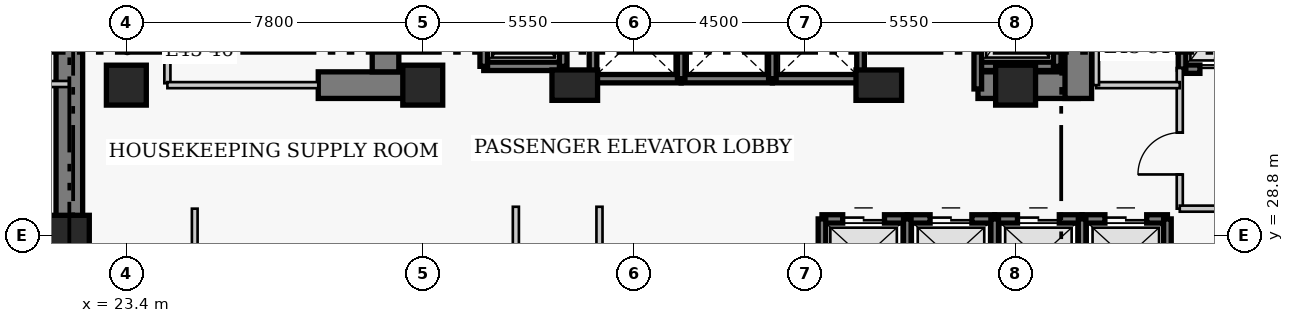
"""IFC4 building model, lengths in metres.
Left out: names, types, materials, properties, quantities, classifications, styles, units other than length and angle.
Written with IfcOpenShell. Run it as: python <this file> out.ifc"""

import sys

from ifc_helpers import new_model, si_unit, direction, frame, frame_2d, origin, origin_2d, place, context, subcontext, project, spatial, rectangle, extrude, element, fill, save


model = new_model("IFC4")
c1 = context("Model", 3, precision=1e-05, world=origin(), true_north=direction((0.0, 1.0)))
c2 = subcontext(c1, "Body", "Model", "MODEL_VIEW")
j1 = project(units=[si_unit("LENGTHUNIT", "METRE"), si_unit("PLANEANGLEUNIT", "RADIAN")], contexts=[c1])
p1 = place(None, origin())
s1 = spatial("IfcSite", under=j1, at=p1, CompositionType="ELEMENT")
p2 = place(p1, origin())
s2 = spatial("IfcBuilding", under=s1, at=p2, CompositionType="ELEMENT")
p3 = place(p2, frame((0.0, 0.0, 172.6)))
s3 = spatial("IfcBuildingStorey", under=s2, at=p3, CompositionType="ELEMENT", Elevation=172.6)
p4 = place(p3, frame((21.9, 27.05, 0.0), z_axis=(0.0, 0.0, 1.0), x_axis=(0.0, 1.0, 0.0)))
e1 = element("IfcWall", 1, at=p4, inside=s3, PredefinedType="SHEAR", context=c2, shape_type="SweptSolid", body=[
    extrude(rectangle(XDim=13.62, YDim=0.7, at=frame_2d((6.81, 0.0))), origin(), (0.0, 0.0, 1.0), 3.8),
])
p5 = place(p3, frame((28.45, 32.75, 0.0), z_axis=(0.0, 0.0, 1.0), x_axis=(1.0, 0.0, 0.0)))
e2 = element("IfcWall", 2, at=p5, inside=s3, PredefinedType="SHEAR", context=c2, shape_type="SweptSolid", body=[
    extrude(rectangle(XDim=2.4, YDim=0.7, at=frame_2d((1.2, 0.0))), origin(), (0.0, 0.0, 1.0), 3.8),
])
p6 = place(p3, frame((45.81, 32.75, 0.0), z_axis=(0.0, 0.0, 1.0), x_axis=(1.0, 0.0, 0.0)))
e3 = element("IfcWall", 3, at=p6, inside=s3, PredefinedType="SHEAR", context=c2, shape_type="SweptSolid", body=[
    extrude(rectangle(XDim=2.64, YDim=0.7, at=frame_2d((1.32, 0.0))), origin(), (0.0, 0.0, 1.0), 3.8),
])
p7 = place(p3, frame((30.22, 33.1, 0.0), z_axis=(0.0, 0.0, 1.0), x_axis=(0.0, 1.0, 0.0)))
e4 = element("IfcWall", 4, at=p7, inside=s3, PredefinedType="SHEAR", context=c2, shape_type="SweptSolid", body=[
    extrude(rectangle(XDim=7.22, YDim=0.7, at=frame_2d((3.61, 0.0))), origin(), (0.0, 0.0, 1.0), 3.8),
])
p8 = place(p3, frame((48.45, 32.4, 0.0), z_axis=(0.0, 0.0, 1.0), x_axis=(0.0, 1.0, 0.0)))
e5 = element("IfcWall", 5, at=p8, inside=s3, PredefinedType="SHEAR", context=c2, shape_type="SweptSolid", body=[
    extrude(rectangle(XDim=7.92, YDim=0.7, at=frame_2d((3.96, 0.0))), origin(), (0.0, 0.0, 1.0), 3.8),
])
p9 = place(p8, frame((5.8, 0.0, 0.0)))
e6 = element("IfcOpeningElement", 6, at=p9, cuts=e5, PredefinedType="OPENING", context=c2, shape_type="SweptSolid", body=[
    extrude(rectangle(XDim=1.1, YDim=2.15, at=frame_2d((0.55, 1.075))), frame((0.0, 0.36, 0.0), z_axis=(0.0, -1.0, 0.0), x_axis=(1.0, 0.0, 0.0)), (0.0, 0.0, 1.0), 0.72),
])
for number, where, z_axis, x_axis in (
    (7, (21.9, 28.8, 0.0), (0.0, 0.0, 1.0), (1.0, 0.0, 0.0)),
    (8, (23.4, 32.75, 0.0), (0.0, 0.0, 1.0), (1.0, 0.0, 0.0)),
    (9, (31.2, 32.75, 0.0), (0.0, 0.0, 1.0), (1.0, 0.0, 0.0)),
):
    element("IfcColumn", number, at=place(p3, frame(where, z_axis=z_axis, x_axis=x_axis)), inside=s3, PredefinedType="COLUMN", context=c2, shape_type="SweptSolid", body=[
        extrude(rectangle(XDim=1.05, YDim=1.05, at=origin_2d()), origin(), (0.0, 0.0, 1.0), 3.8),
    ])
for number, where, z_axis, x_axis in (
    (10, (35.2, 32.75, 0.0), (0.0, 0.0, 1.0), (1.0, 0.0, 0.0)),
    (11, (43.2, 32.75, 0.0), (0.0, 0.0, 1.0), (1.0, 0.0, 0.0)),
):
    element("IfcColumn", number, at=place(p3, frame(where, z_axis=z_axis, x_axis=x_axis)), inside=s3, PredefinedType="COLUMN", context=c2, shape_type="SweptSolid", body=[
        extrude(rectangle(XDim=1.2, YDim=0.8, at=origin_2d()), origin(), (0.0, 0.0, 1.0), 3.8),
    ])
p10 = place(p3, frame((46.8, 32.75, 0.0), z_axis=(0.0, 0.0, 1.0), x_axis=(1.0, 0.0, 0.0)))
e12 = element("IfcColumn", 12, at=p10, inside=s3, PredefinedType="COLUMN", context=c2, shape_type="SweptSolid", body=[
    extrude(rectangle(XDim=1.05, YDim=1.05, at=origin_2d()), origin(), (0.0, 0.0, 1.0), 3.8),
])
p11 = place(p3, frame((41.705, 29.23, 0.0), z_axis=(0.0, 0.0, 1.0), x_axis=(1.0, 0.0, 0.0)))
e13 = element("IfcWall", 13, at=p11, inside=s3, PredefinedType="SHEAR", context=c2, shape_type="SweptSolid", body=[
    extrude(rectangle(XDim=2.245, YDim=0.22, at=frame_2d((1.123, 0.0))), origin(), (0.0, 0.0, 1.0), 3.8),
])
p12 = place(p11, frame((0.545, 0.0, 0.0)))
e14 = element("IfcOpeningElement", 14, at=p12, cuts=e13, PredefinedType="OPENING", context=c2, shape_type="SweptSolid", body=[
    extrude(rectangle(XDim=1.1, YDim=2.15, at=frame_2d((0.55, 1.075))), frame((0.0, 0.12, 0.0), z_axis=(0.0, -1.0, 0.0), x_axis=(1.0, 0.0, 0.0)), (0.0, 0.0, 1.0), 0.24),
])
p13 = place(p3, frame((41.705, 27.17, 0.0), z_axis=(0.0, 0.0, 1.0), x_axis=(0.0, 1.0, 0.0)))
e15 = element("IfcWall", 15, at=p13, inside=s3, PredefinedType="SHEAR", context=c2, shape_type="SweptSolid", body=[
    extrude(rectangle(XDim=2.06, YDim=0.2, at=frame_2d((1.03, 0.0))), origin(), (0.0, 0.0, 1.0), 3.8),
])
p14 = place(p3, frame((43.95, 29.23, 0.0), z_axis=(0.0, 0.0, 1.0), x_axis=(1.0, 0.0, 0.0)))
e16 = element("IfcWall", 16, at=p14, inside=s3, PredefinedType="SHEAR", context=c2, shape_type="SweptSolid", body=[
    extrude(rectangle(XDim=2.3, YDim=0.22, at=frame_2d((1.15, 0.0))), origin(), (0.0, 0.0, 1.0), 3.8),
])
p15 = place(p14, frame((0.6, 0.0, 0.0)))
e17 = element("IfcOpeningElement", 17, at=p15, cuts=e16, PredefinedType="OPENING", context=c2, shape_type="SweptSolid", body=[
    extrude(rectangle(XDim=1.1, YDim=2.15, at=frame_2d((0.55, 1.075))), frame((0.0, 0.12, 0.0), z_axis=(0.0, -1.0, 0.0), x_axis=(1.0, 0.0, 0.0)), (0.0, 0.0, 1.0), 0.24),
])
p16 = place(p3, frame((43.95, 27.17, 0.0), z_axis=(0.0, 0.0, 1.0), x_axis=(0.0, 1.0, 0.0)))
e18 = element("IfcWall", 18, at=p16, inside=s3, PredefinedType="SHEAR", context=c2, shape_type="SweptSolid", body=[
    extrude(rectangle(XDim=2.06, YDim=0.2, at=frame_2d((1.03, 0.0))), origin(), (0.0, 0.0, 1.0), 3.8),
])
p17 = place(p3, frame((46.25, 29.23, 0.0), z_axis=(0.0, 0.0, 1.0), x_axis=(1.0, 0.0, 0.0)))
e19 = element("IfcWall", 19, at=p17, inside=s3, PredefinedType="SHEAR", context=c2, shape_type="SweptSolid", body=[
    extrude(rectangle(XDim=2.3, YDim=0.22, at=frame_2d((1.15, 0.0))), origin(), (0.0, 0.0, 1.0), 3.8),
])
p18 = place(p17, frame((0.6, 0.0, 0.0)))
e20 = element("IfcOpeningElement", 20, at=p18, cuts=e19, PredefinedType="OPENING", context=c2, shape_type="SweptSolid", body=[
    extrude(rectangle(XDim=1.1, YDim=2.15, at=frame_2d((0.55, 1.075))), frame((0.0, 0.12, 0.0), z_axis=(0.0, -1.0, 0.0), x_axis=(1.0, 0.0, 0.0)), (0.0, 0.0, 1.0), 0.24),
])
p19 = place(p3, frame((46.25, 27.17, 0.0), z_axis=(0.0, 0.0, 1.0), x_axis=(0.0, 1.0, 0.0)))
e21 = element("IfcWall", 21, at=p19, inside=s3, PredefinedType="SHEAR", context=c2, shape_type="SweptSolid", body=[
    extrude(rectangle(XDim=2.06, YDim=0.2, at=frame_2d((1.03, 0.0))), origin(), (0.0, 0.0, 1.0), 3.8),
])
p20 = place(p3, frame((48.55, 29.23, 0.0), z_axis=(0.0, 0.0, 1.0), x_axis=(1.0, 0.0, 0.0)))
e22 = element("IfcWall", 22, at=p20, inside=s3, PredefinedType="SHEAR", context=c2, shape_type="SweptSolid", body=[
    extrude(rectangle(XDim=2.245, YDim=0.22, at=frame_2d((1.123, 0.0))), origin(), (0.0, 0.0, 1.0), 3.8),
])
p21 = place(p20, frame((0.6, 0.0, 0.0)))
e23 = element("IfcOpeningElement", 23, at=p21, cuts=e22, PredefinedType="OPENING", context=c2, shape_type="SweptSolid", body=[
    extrude(rectangle(XDim=1.1, YDim=2.15, at=frame_2d((0.55, 1.075))), frame((0.0, 0.12, 0.0), z_axis=(0.0, -1.0, 0.0), x_axis=(1.0, 0.0, 0.0)), (0.0, 0.0, 1.0), 0.24),
])
for number, where, z_axis, x_axis in (
    (24, (48.55, 27.17, 0.0), (0.0, 0.0, 1.0), (0.0, 1.0, 0.0)),
    (25, (50.795, 27.17, 0.0), (0.0, 0.0, 1.0), (0.0, 1.0, 0.0)),
):
    element("IfcWall", number, at=place(p3, frame(where, z_axis=z_axis, x_axis=x_axis)), inside=s3, PredefinedType="SHEAR", context=c2, shape_type="SweptSolid", body=[
        extrude(rectangle(XDim=2.06, YDim=0.2, at=frame_2d((1.03, 0.0))), origin(), (0.0, 0.0, 1.0), 3.8),
    ])
p22 = place(p3, frame((35.68, 32.92, 0.0), z_axis=(0.0, 0.0, 1.0), x_axis=(1.0, 0.0, 0.0)))
e26 = element("IfcWall", 26, at=p22, inside=s3, PredefinedType="SHEAR", context=c2, shape_type="SweptSolid", body=[
    extrude(rectangle(XDim=2.32, YDim=0.22, at=frame_2d((1.16, 0.0))), origin(), (0.0, 0.0, 1.0), 3.8),
])
p23 = place(p3, frame((35.68, 32.92, 0.0), z_axis=(0.0, 0.0, 1.0), x_axis=(0.0, 1.0, 0.0)))
e27 = element("IfcWall", 27, at=p23, inside=s3, PredefinedType="SHEAR", context=c2, shape_type="SweptSolid", body=[
    extrude(rectangle(XDim=2.16, YDim=0.2, at=frame_2d((1.08, 0.0))), origin(), (0.0, 0.0, 1.0), 3.8),
])
p24 = place(p3, frame((38.0, 32.92, 0.0), z_axis=(0.0, 0.0, 1.0), x_axis=(1.0, 0.0, 0.0)))
e28 = element("IfcWall", 28, at=p24, inside=s3, PredefinedType="SHEAR", context=c2, shape_type="SweptSolid", body=[
    extrude(rectangle(XDim=2.4, YDim=0.22, at=frame_2d((1.2, 0.0))), origin(), (0.0, 0.0, 1.0), 3.8),
])
p25 = place(p3, frame((38.0, 32.92, 0.0), z_axis=(0.0, 0.0, 1.0), x_axis=(0.0, 1.0, 0.0)))
e29 = element("IfcWall", 29, at=p25, inside=s3, PredefinedType="SHEAR", context=c2, shape_type="SweptSolid", body=[
    extrude(rectangle(XDim=2.16, YDim=0.2, at=frame_2d((1.08, 0.0))), origin(), (0.0, 0.0, 1.0), 3.8),
])
p26 = place(p3, frame((40.4, 32.92, 0.0), z_axis=(0.0, 0.0, 1.0), x_axis=(1.0, 0.0, 0.0)))
e30 = element("IfcWall", 30, at=p26, inside=s3, PredefinedType="SHEAR", context=c2, shape_type="SweptSolid", body=[
    extrude(rectangle(XDim=2.32, YDim=0.22, at=frame_2d((1.16, 0.0))), origin(), (0.0, 0.0, 1.0), 3.8),
])
for number, where, z_axis, x_axis in (
    (31, (40.4, 32.92, 0.0), (0.0, 0.0, 1.0), (0.0, 1.0, 0.0)),
    (32, (42.72, 32.92, 0.0), (0.0, 0.0, 1.0), (0.0, 1.0, 0.0)),
):
    element("IfcWall", number, at=place(p3, frame(where, z_axis=z_axis, x_axis=x_axis)), inside=s3, PredefinedType="SHEAR", context=c2, shape_type="SweptSolid", body=[
        extrude(rectangle(XDim=2.16, YDim=0.2, at=frame_2d((1.08, 0.0))), origin(), (0.0, 0.0, 1.0), 3.8),
    ])
p27 = place(p3, frame((51.18, 33.17, 0.0), z_axis=(0.0, 0.0, 1.0), x_axis=(1.0, 0.0, 0.0)))
e33 = element("IfcWall", 33, at=p27, inside=s3, PredefinedType="SHEAR", context=c2, shape_type="SweptSolid", body=[
    extrude(rectangle(XDim=2.42, YDim=0.22, at=frame_2d((1.21, 0.0))), origin(), (0.0, 0.0, 1.0), 3.8),
])
p28 = place(p27, frame((0.47, 0.0, 0.0)))
e34 = element("IfcOpeningElement", 34, at=p28, cuts=e33, PredefinedType="OPENING", context=c2, shape_type="SweptSolid", body=[
    extrude(rectangle(XDim=1.3, YDim=2.15, at=frame_2d((0.65, 1.075))), frame((0.0, 0.12, 0.0), z_axis=(0.0, -1.0, 0.0), x_axis=(1.0, 0.0, 0.0)), (0.0, 0.0, 1.0), 0.24),
])
p29 = place(p3, frame((51.18, 33.17, 0.0), z_axis=(0.0, 0.0, 1.0), x_axis=(0.0, 1.0, 0.0)))
e35 = element("IfcWall", 35, at=p29, inside=s3, PredefinedType="SHEAR", context=c2, shape_type="SweptSolid", body=[
    extrude(rectangle(XDim=2.86, YDim=0.2, at=frame_2d((1.43, 0.0))), origin(), (0.0, 0.0, 1.0), 3.8),
])
p30 = place(p3, frame((32.805, 33.245, 0.0), z_axis=(0.0, 0.0, 1.0), x_axis=(1.0, 0.0, 0.0)))
e36 = element("IfcWall", 36, at=p30, inside=s3, PredefinedType="SHEAR", context=c2, shape_type="SweptSolid", body=[
    extrude(rectangle(XDim=2.09, YDim=0.22, at=frame_2d((1.045, 0.0))), origin(), (0.0, 0.0, 1.0), 3.8),
])
for number, where, z_axis, x_axis in (
    (37, (32.805, 33.245, 0.0), (0.0, 0.0, 1.0), (0.0, 1.0, 0.0)),
    (38, (34.895, 33.245, 0.0), (0.0, 0.0, 1.0), (0.0, 1.0, 0.0)),
):
    element("IfcWall", number, at=place(p3, frame(where, z_axis=z_axis, x_axis=x_axis)), inside=s3, PredefinedType="SHEAR", context=c2, shape_type="SweptSolid", body=[
        extrude(rectangle(XDim=2.91, YDim=0.2, at=frame_2d((1.455, 0.0))), origin(), (0.0, 0.0, 1.0), 3.8),
    ])
p31 = place(p3, frame((45.805, 33.245, 0.0), z_axis=(0.0, 0.0, 1.0), x_axis=(1.0, 0.0, 0.0)))
e39 = element("IfcWall", 39, at=p31, inside=s3, PredefinedType="SHEAR", context=c2, shape_type="SweptSolid", body=[
    extrude(rectangle(XDim=2.09, YDim=0.22, at=frame_2d((1.045, 0.0))), origin(), (0.0, 0.0, 1.0), 3.8),
])
p32 = place(p3, frame((45.805, 32.65, 0.0), z_axis=(0.0, 0.0, 1.0), x_axis=(0.0, 1.0, 0.0)))
e40 = element("IfcWall", 40, at=p32, inside=s3, PredefinedType="SHEAR", context=c2, shape_type="SweptSolid", body=[
    extrude(rectangle(XDim=3.505, YDim=0.2, at=frame_2d((1.752, 0.0))), origin(), (0.0, 0.0, 1.0), 3.8),
])
p33 = place(p3, frame((47.895, 33.245, 0.0), z_axis=(0.0, 0.0, 1.0), x_axis=(0.0, 1.0, 0.0)))
e41 = element("IfcWall", 41, at=p33, inside=s3, PredefinedType="SHEAR", context=c2, shape_type="SweptSolid", body=[
    extrude(rectangle(XDim=2.91, YDim=0.2, at=frame_2d((1.455, 0.0))), origin(), (0.0, 0.0, 1.0), 3.8),
])
p34 = place(p3, frame((24.48, 32.8, 0.0), z_axis=(0.0, 0.0, 1.0), x_axis=(0.0, 1.0, 0.0)))
e42 = element("IfcWall", 42, at=p34, inside=s3, PredefinedType="PARTITIONING", context=c2, shape_type="SweptSolid", body=[
    extrude(rectangle(XDim=3.57, YDim=0.16, at=frame_2d((1.785, 0.0))), origin(), (0.0, 0.0, 1.0), 3.55),
])
p35 = place(p34, frame((1.604, 0.0, 0.0)))
e43 = element("IfcOpeningElement", 43, at=p35, cuts=e42, PredefinedType="OPENING", context=c2, shape_type="SweptSolid", body=[
    extrude(rectangle(XDim=0.9, YDim=2.1, at=frame_2d((0.45, 1.05))), frame((0.0, 0.09, 0.0), z_axis=(0.0, -1.0, 0.0), x_axis=(1.0, 0.0, 0.0)), (0.0, 0.0, 1.0), 0.18),
])
p36 = place(p3, frame((51.12, 29.5, 0.0), z_axis=(0.0, 0.0, 1.0), x_axis=(0.0, 1.0, 0.0)))
e44 = element("IfcWall", 44, at=p36, inside=s3, PredefinedType="PARTITIONING", context=c2, shape_type="SweptSolid", body=[
    extrude(rectangle(XDim=3.7, YDim=0.16, at=frame_2d((1.85, 0.0))), origin(), (0.0, 0.0, 1.0), 3.55),
])
p37 = place(p36, frame((0.9, 0.0, 0.0)))
e45 = element("IfcOpeningElement", 45, at=p37, cuts=e44, PredefinedType="OPENING", context=c2, shape_type="SweptSolid", body=[
    extrude(rectangle(XDim=1.1, YDim=2.15, at=frame_2d((0.55, 1.075))), frame((0.0, 0.09, 0.0), z_axis=(0.0, -1.0, 0.0), x_axis=(1.0, 0.0, 0.0)), (0.0, 0.0, 1.0), 0.18),
])
p38 = place(p3, frame((51.12, 29.5, 0.0), z_axis=(0.0, 0.0, 1.0), x_axis=(1.0, 0.0, 0.0)))
e46 = element("IfcWall", 46, at=p38, inside=s3, PredefinedType="PARTITIONING", context=c2, shape_type="SweptSolid", body=[
    extrude(rectangle(XDim=5.63, YDim=0.16, at=frame_2d((2.815, 0.0))), origin(), (0.0, 0.0, 1.0), 3.55),
])
p39 = place(p3, frame((24.48, 32.75, 0.0), z_axis=(0.0, 0.0, 1.0), x_axis=(1.0, 0.0, 0.0)))
e47 = element("IfcWall", 47, at=p39, inside=s3, PredefinedType="PARTITIONING", context=c2, shape_type="SweptSolid", body=[
    extrude(rectangle(XDim=3.97, YDim=0.16, at=frame_2d((1.985, 0.0))), origin(), (0.0, 0.0, 1.0), 3.55),
])
p40 = place(p3, frame((48.92, 32.75, 0.0), z_axis=(0.0, 0.0, 1.0), x_axis=(1.0, 0.0, 0.0)))
e48 = element("IfcWall", 48, at=p40, inside=s3, PredefinedType="PARTITIONING", context=c2, shape_type="SweptSolid", body=[
    extrude(rectangle(XDim=2.2, YDim=0.16, at=frame_2d((1.1, 0.0))), origin(), (0.0, 0.0, 1.0), 3.55),
])
p41 = place(p3, frame((48.92, 32.75, 0.0), z_axis=(0.0, 0.0, 1.0), x_axis=(0.0, 1.0, 0.0)))
e49 = element("IfcWall", 49, at=p41, inside=s3, PredefinedType="PARTITIONING", context=c2, shape_type="SweptSolid", body=[
    extrude(rectangle(XDim=3.62, YDim=0.15, at=frame_2d((1.81, 0.0))), origin(), (0.0, 0.0, 1.0), 3.55),
])
for number, where, z_axis, x_axis in (
    (50, (33.65, 19.16, 0.0), (0.0, 0.0, 1.0), (0.0, 1.0, 0.0)),
    (51, (35.85, 19.16, 0.0), (0.0, 0.0, 1.0), (0.0, 1.0, 0.0)),
):
    element("IfcWall", number, at=place(p3, frame(where, z_axis=z_axis, x_axis=x_axis)), inside=s3, PredefinedType="PARTITIONING", context=c2, shape_type="SweptSolid", body=[
        extrude(rectangle(XDim=10.39, YDim=0.16, at=frame_2d((5.195, 0.0))), origin(), (0.0, 0.0, 1.0), 3.55),
    ])
p42 = place(p3, frame((19.96, 32.78, 0.0), z_axis=(0.0, 0.0, 1.0), x_axis=(1.0, 0.0, 0.0)))
e52 = element("IfcWall", 52, at=p42, inside=s3, PredefinedType="PARTITIONING", context=c2, shape_type="SweptSolid", body=[
    extrude(rectangle(XDim=1.94, YDim=0.16, at=frame_2d((0.97, 0.0))), origin(), (0.0, 0.0, 1.0), 3.55),
])
p43 = place(p3, frame((25.2, 19.16, 0.0), z_axis=(0.0, 0.0, 1.0), x_axis=(0.0, 1.0, 0.0)))
e53 = element("IfcWall", 53, at=p43, inside=s3, PredefinedType="PARTITIONING", context=c2, shape_type="SweptSolid", body=[
    extrude(rectangle(XDim=10.34, YDim=0.15, at=frame_2d((5.17, 0.0))), origin(), (0.0, 0.0, 1.0), 3.55),
])
p44 = place(p12, origin())
e54 = element("IfcDoor", 54, at=p44, inside=s3, OperationType="DOUBLE_DOOR_SLIDING", PredefinedType="DOOR", context=c2, shape_type="SweptSolid", body=[
    extrude(rectangle(XDim=1.1, YDim=2.15, at=frame_2d((0.55, 1.075))), frame((0.0, 0.025, 0.0), z_axis=(0.0, -1.0, 0.0), x_axis=(1.0, 0.0, 0.0)), (0.0, 0.0, 1.0), 0.05),
])
fill(e14, e54)
p45 = place(p15, origin())
e55 = element("IfcDoor", 55, at=p45, inside=s3, OperationType="DOUBLE_DOOR_SLIDING", PredefinedType="DOOR", context=c2, shape_type="SweptSolid", body=[
    extrude(rectangle(XDim=1.1, YDim=2.15, at=frame_2d((0.55, 1.075))), frame((0.0, 0.025, 0.0), z_axis=(0.0, -1.0, 0.0), x_axis=(1.0, 0.0, 0.0)), (0.0, 0.0, 1.0), 0.05),
])
fill(e17, e55)
p46 = place(p18, origin())
e56 = element("IfcDoor", 56, at=p46, inside=s3, OperationType="DOUBLE_DOOR_SLIDING", PredefinedType="DOOR", context=c2, shape_type="SweptSolid", body=[
    extrude(rectangle(XDim=1.1, YDim=2.15, at=frame_2d((0.55, 1.075))), frame((0.0, 0.025, 0.0), z_axis=(0.0, -1.0, 0.0), x_axis=(1.0, 0.0, 0.0)), (0.0, 0.0, 1.0), 0.05),
])
fill(e20, e56)
p47 = place(p21, origin())
e57 = element("IfcDoor", 57, at=p47, inside=s3, OperationType="DOUBLE_DOOR_SLIDING", PredefinedType="DOOR", context=c2, shape_type="SweptSolid", body=[
    extrude(rectangle(XDim=1.1, YDim=2.15, at=frame_2d((0.55, 1.075))), frame((0.0, 0.025, 0.0), z_axis=(0.0, -1.0, 0.0), x_axis=(1.0, 0.0, 0.0)), (0.0, 0.0, 1.0), 0.05),
])
fill(e23, e57)
p48 = place(p28, origin())
e58 = element("IfcDoor", 58, at=p48, inside=s3, OperationType="DOUBLE_DOOR_SLIDING", PredefinedType="DOOR", context=c2, shape_type="SweptSolid", body=[
    extrude(rectangle(XDim=1.3, YDim=2.15, at=frame_2d((0.65, 1.075))), frame((0.0, 0.025, 0.0), z_axis=(0.0, -1.0, 0.0), x_axis=(1.0, 0.0, 0.0)), (0.0, 0.0, 1.0), 0.05),
])
fill(e34, e58)
p49 = place(p37, origin())
e59 = element("IfcDoor", 59, at=p49, inside=s3, OperationType="SINGLE_SWING_LEFT", PredefinedType="DOOR", context=c2, shape_type="SweptSolid", body=[
    extrude(rectangle(XDim=1.1, YDim=2.15, at=frame_2d((0.55, 1.075))), frame((0.0, 0.025, 0.0), z_axis=(0.0, -1.0, 0.0), x_axis=(1.0, 0.0, 0.0)), (0.0, 0.0, 1.0), 0.05),
])
fill(e45, e59)
save(model, sys.argv[1])
